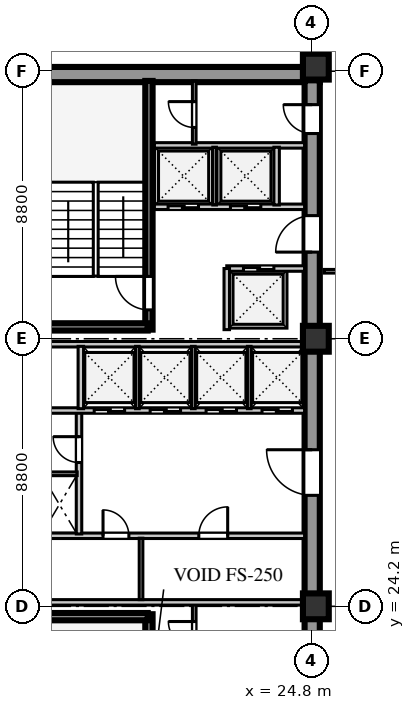
"""IFC4 building model, lengths in metres.
Left out: names, types, materials, properties, quantities, classifications, styles, units other than length and angle.
Written with IfcOpenShell. Run it as: python <this file> out.ifc"""

import sys

from ifc_helpers import new_model, si_unit, direction, frame, frame_2d, origin, origin_2d, place, context, subcontext, project, spatial, rectangle, extrude, element, fill, save


model = new_model("IFC4")
c1 = context("Model", 3, precision=1e-05, world=origin(), true_north=direction((0.0, 1.0)))
c2 = subcontext(c1, "Body", "Model", "MODEL_VIEW")
j1 = project(units=[si_unit("LENGTHUNIT", "METRE"), si_unit("PLANEANGLEUNIT", "RADIAN")], contexts=[c1])
p1 = place(None, origin())
s1 = spatial("IfcSite", under=j1, at=p1, CompositionType="ELEMENT")
p2 = place(p1, origin())
s2 = spatial("IfcBuilding", under=s1, at=p2, CompositionType="ELEMENT")
p3 = place(p2, frame((0.0, 0.0, 111.7)))
s3 = spatial("IfcBuildingStorey", under=s2, at=p3, CompositionType="ELEMENT", Elevation=111.7)
p4 = place(p3, frame((15.4, 41.69, 0.0), z_axis=(0.0, 0.0, 1.0), x_axis=(1.0, 0.0, 0.0)))
e1 = element("IfcWall", 1, at=p4, inside=s3, PredefinedType="SHEAR", context=c2, shape_type="SweptSolid", body=[
    extrude(rectangle(XDim=9.68, YDim=0.5, at=frame_2d((4.84, 0.0))), origin(), (0.0, 0.0, 1.0), 3.6),
])
p5 = place(p3, frame((24.83, 15.74, 0.0), z_axis=(0.0, 0.0, 1.0), x_axis=(0.0, 1.0, 0.0)))
e2 = element("IfcWall", 2, at=p5, inside=s3, PredefinedType="SHEAR", context=c2, shape_type="SweptSolid", body=[
    extrude(rectangle(XDim=25.76, YDim=0.5, at=frame_2d((12.88, 0.0))), origin(), (0.0, 0.0, 1.0), 3.6),
])
p6 = place(p5, frame((1.61, 0.0, 0.0)))
e3 = element("IfcOpeningElement", 3, at=p6, cuts=e2, PredefinedType="OPENING", context=c2, shape_type="SweptSolid", body=[
    extrude(rectangle(XDim=1.2, YDim=2.1, at=frame_2d((0.6, 1.05))), frame((0.0, 0.26, 0.0), z_axis=(0.0, -1.0, 0.0), x_axis=(1.0, 0.0, 0.0)), (0.0, 0.0, 1.0), 0.52),
])
p7 = place(p5, frame((6.78, 0.0, 0.0)))
e4 = element("IfcOpeningElement", 4, at=p7, cuts=e2, PredefinedType="OPENING", context=c2, shape_type="SweptSolid", body=[
    extrude(rectangle(XDim=0.85, YDim=2.06, at=frame_2d((0.425, 1.03))), frame((0.0, 0.26, 0.0), z_axis=(0.0, -1.0, 0.0), x_axis=(1.0, 0.0, 0.0)), (0.0, 0.0, 1.0), 0.52),
])
p8 = place(p5, frame((12.11, 0.0, 0.0)))
e5 = element("IfcOpeningElement", 5, at=p8, cuts=e2, PredefinedType="OPENING", context=c2, shape_type="SweptSolid", body=[
    extrude(rectangle(XDim=1.5, YDim=2.12, at=frame_2d((0.75, 1.06))), frame((0.0, 0.26, 0.0), z_axis=(0.0, -1.0, 0.0), x_axis=(1.0, 0.0, 0.0)), (0.0, 0.0, 1.0), 0.52),
])
p9 = place(p5, frame((20.11, 0.0, 0.0)))
e6 = element("IfcOpeningElement", 6, at=p9, cuts=e2, PredefinedType="OPENING", context=c2, shape_type="SweptSolid", body=[
    extrude(rectangle(XDim=1.2, YDim=2.12, at=frame_2d((0.6, 1.06))), frame((0.0, 0.26, 0.0), z_axis=(0.0, -1.0, 0.0), x_axis=(1.0, 0.0, 0.0)), (0.0, 0.0, 1.0), 0.52),
])
p10 = place(p5, frame((24.01, 0.0, 0.0)))
e7 = element("IfcOpeningElement", 7, at=p10, cuts=e2, PredefinedType="OPENING", context=c2, shape_type="SweptSolid", body=[
    extrude(rectangle(XDim=0.95, YDim=2.1, at=frame_2d((0.475, 1.05))), frame((0.0, 0.26, 0.0), z_axis=(0.0, -1.0, 0.0), x_axis=(1.0, 0.0, 0.0)), (0.0, 0.0, 1.0), 0.52),
])
for number, where, z_axis, x_axis in (
    (8, (24.95, 24.2, 0.0), (0.0, 0.0, 1.0), (1.0, 0.0, 0.0)),
    (9, (24.95, 33.0, 0.0), (0.0, 0.0, 1.0), (1.0, 0.0, 0.0)),
    (10, (24.95, 41.95, 0.0), (0.0, 0.0, 1.0), (1.0, 0.0, 0.0)),
):
    element("IfcColumn", number, at=place(p3, frame(where, z_axis=z_axis, x_axis=x_axis)), inside=s3, PredefinedType="COLUMN", context=c2, shape_type="SweptSolid", body=[
        extrude(rectangle(XDim=0.85, YDim=0.85, at=origin_2d()), origin(), (0.0, 0.0, 1.0), 3.6),
    ])
p11 = place(p3, frame((19.46, 15.74, 0.0), z_axis=(0.0, 0.0, 1.0), x_axis=(0.0, 1.0, 0.0)))
e11 = element("IfcWall", 11, at=p11, inside=s3, PredefinedType="SHEAR", context=c2, shape_type="SweptSolid", body=[
    extrude(rectangle(XDim=8.2, YDim=0.24, at=frame_2d((4.1, 0.0))), origin(), (0.0, 0.0, 1.0), 3.85),
])
p12 = place(p11, frame((0.45, 0.0, 0.0)))
e12 = element("IfcOpeningElement", 12, at=p12, cuts=e11, PredefinedType="OPENING", context=c2, shape_type="SweptSolid", body=[
    extrude(rectangle(XDim=1.1, YDim=2.1, at=frame_2d((0.55, 1.05))), frame((0.0, 0.13, 0.0), z_axis=(0.0, -1.0, 0.0), x_axis=(1.0, 0.0, 0.0)), (0.0, 0.0, 1.0), 0.26),
])
p13 = place(p3, frame((15.9, 23.86, 0.0), z_axis=(0.0, 0.0, 1.0), x_axis=(1.0, 0.0, 0.0)))
e13 = element("IfcWall", 13, at=p13, inside=s3, PredefinedType="SHEAR", context=c2, shape_type="SweptSolid", body=[
    extrude(rectangle(XDim=3.52, YDim=0.24, at=frame_2d((1.76, 0.0))), origin(), (0.0, 0.0, 1.0), 3.85),
])
p14 = place(p3, frame((20.95, 22.4, 0.0), z_axis=(0.0, 0.0, 1.0), x_axis=(0.0, 1.0, 0.0)))
e14 = element("IfcWall", 14, at=p14, inside=s3, PredefinedType="PARTITIONING", context=c2, shape_type="SweptSolid", body=[
    extrude(rectangle(XDim=1.88, YDim=0.12, at=frame_2d((0.94, 0.0))), origin(), (0.0, 0.0, 1.0), 3.6),
])
p15 = place(p14, frame((0.45, 0.0, 0.0)))
e15 = element("IfcOpeningElement", 15, at=p15, cuts=e14, PredefinedType="OPENING", context=c2, shape_type="SweptSolid", body=[
    extrude(rectangle(XDim=0.85, YDim=2.06, at=frame_2d((0.425, 1.03))), frame((0.0, 0.07, 0.0), z_axis=(0.0, -1.0, 0.0), x_axis=(1.0, 0.0, 0.0)), (0.0, 0.0, 1.0), 0.14),
])
p16 = place(p3, frame((15.9, 26.52, 0.0), z_axis=(0.0, 0.0, 1.0), x_axis=(1.0, 0.0, 0.0)))
e16 = element("IfcWall", 16, at=p16, inside=s3, PredefinedType="SOLIDWALL", context=c2, shape_type="SweptSolid", body=[
    extrude(rectangle(XDim=8.68, YDim=0.18, at=frame_2d((4.34, 0.0))), origin(), (0.0, 0.0, 1.0), 3.6),
])
p17 = place(p16, frame((2.05, 0.0, 0.0)))
e17 = element("IfcOpeningElement", 17, at=p17, cuts=e16, PredefinedType="OPENING", context=c2, shape_type="SweptSolid", body=[
    extrude(rectangle(XDim=0.85, YDim=2.06, at=frame_2d((0.425, 1.03))), frame((0.0, 0.1, 0.0), z_axis=(0.0, -1.0, 0.0), x_axis=(1.0, 0.0, 0.0)), (0.0, 0.0, 1.0), 0.2),
])
p18 = place(p16, frame((5.2, 0.0, 0.0)))
e18 = element("IfcOpeningElement", 18, at=p18, cuts=e16, PredefinedType="OPENING", context=c2, shape_type="SweptSolid", body=[
    extrude(rectangle(XDim=0.95, YDim=2.1, at=frame_2d((0.475, 1.05))), frame((0.0, 0.1, 0.0), z_axis=(0.0, -1.0, 0.0), x_axis=(1.0, 0.0, 0.0)), (0.0, 0.0, 1.0), 0.2),
])
p19 = place(p3, frame((15.9, 24.33, 0.0), z_axis=(0.0, 0.0, 1.0), x_axis=(1.0, 0.0, 0.0)))
e19 = element("IfcWall", 19, at=p19, inside=s3, PredefinedType="SOLIDWALL", context=c2, shape_type="SweptSolid", body=[
    extrude(rectangle(XDim=8.68, YDim=0.18, at=frame_2d((4.34, 0.0))), origin(), (0.0, 0.0, 1.0), 2.95),
])
p20 = place(p3, frame((19.2, 24.42, 0.0), z_axis=(0.0, 0.0, 1.0), x_axis=(0.0, 1.0, 0.0)))
e20 = element("IfcWall", 20, at=p20, inside=s3, PredefinedType="PARTITIONING", context=c2, shape_type="SweptSolid", body=[
    extrude(rectangle(XDim=2.02, YDim=0.12, at=frame_2d((1.01, 0.0))), origin(), (0.0, 0.0, 1.0), 3.6),
])
p21 = place(p3, frame((17.16, 26.58, 0.0), z_axis=(0.0, 0.0, 1.0), x_axis=(0.0, 1.0, 0.0)))
e21 = element("IfcWall", 21, at=p21, inside=s3, PredefinedType="SOLIDWALL", context=c2, shape_type="SweptSolid", body=[
    extrude(rectangle(XDim=4.02, YDim=0.18, at=frame_2d((2.01, 0.0))), origin(), (0.0, 0.0, 1.0), 3.6),
])
p22 = place(p21, frame((2.35, 0.0, 0.0)))
e22 = element("IfcOpeningElement", 22, at=p22, cuts=e21, PredefinedType="OPENING", context=c2, shape_type="SweptSolid", body=[
    extrude(rectangle(XDim=0.85, YDim=2.06, at=frame_2d((0.425, 1.03))), frame((0.0, 0.1, 0.0), z_axis=(0.0, -1.0, 0.0), x_axis=(1.0, 0.0, 0.0)), (0.0, 0.0, 1.0), 0.2),
])
p23 = place(p3, frame((15.9, 28.56, 0.0), z_axis=(0.0, 0.0, 1.0), x_axis=(1.0, 0.0, 0.0)))
e23 = element("IfcWall", 23, at=p23, inside=s3, PredefinedType="PARTITIONING", context=c2, shape_type="SweptSolid", body=[
    extrude(rectangle(XDim=1.2, YDim=0.12, at=frame_2d((0.6, 0.0))), origin(), (0.0, 0.0, 1.0), 3.6),
])
p24 = place(p3, frame((15.9, 30.64, 0.0), z_axis=(0.0, 0.0, 1.0), x_axis=(1.0, 0.0, 0.0)))
e24 = element("IfcWall", 24, at=p24, inside=s3, PredefinedType="SOLIDWALL", context=c2, shape_type="SweptSolid", body=[
    extrude(rectangle(XDim=8.68, YDim=0.18, at=frame_2d((4.34, 0.0))), origin(), (0.0, 0.0, 1.0), 3.6),
])
p25 = place(p24, frame((1.76, 0.0, 0.0)))
e25 = element("IfcOpeningElement", 25, at=p25, cuts=e24, PredefinedType="OPENING", context=c2, shape_type="SweptSolid", body=[
    extrude(rectangle(XDim=1.0, YDim=2.1, at=frame_2d((0.5, 1.05))), frame((0.0, 0.1, 0.0), z_axis=(0.0, -1.0, 0.0), x_axis=(1.0, 0.0, 0.0)), (0.0, 0.0, 1.0), 0.2),
])
p26 = place(p24, frame((3.6, 0.0, 0.0)))
e26 = element("IfcOpeningElement", 26, at=p26, cuts=e24, PredefinedType="OPENING", context=c2, shape_type="SweptSolid", body=[
    extrude(rectangle(XDim=1.0, YDim=2.1, at=frame_2d((0.5, 1.05))), frame((0.0, 0.1, 0.0), z_axis=(0.0, -1.0, 0.0), x_axis=(1.0, 0.0, 0.0)), (0.0, 0.0, 1.0), 0.2),
])
p27 = place(p24, frame((5.44, 0.0, 0.0)))
e27 = element("IfcOpeningElement", 27, at=p27, cuts=e24, PredefinedType="OPENING", context=c2, shape_type="SweptSolid", body=[
    extrude(rectangle(XDim=1.0, YDim=2.1, at=frame_2d((0.5, 1.05))), frame((0.0, 0.1, 0.0), z_axis=(0.0, -1.0, 0.0), x_axis=(1.0, 0.0, 0.0)), (0.0, 0.0, 1.0), 0.2),
])
p28 = place(p24, frame((7.28, 0.0, 0.0)))
e28 = element("IfcOpeningElement", 28, at=p28, cuts=e24, PredefinedType="OPENING", context=c2, shape_type="SweptSolid", body=[
    extrude(rectangle(XDim=1.0, YDim=2.1, at=frame_2d((0.5, 1.05))), frame((0.0, 0.1, 0.0), z_axis=(0.0, -1.0, 0.0), x_axis=(1.0, 0.0, 0.0)), (0.0, 0.0, 1.0), 0.2),
])
p29 = place(p3, frame((15.9, 32.82, 0.0), z_axis=(0.0, 0.0, 1.0), x_axis=(1.0, 0.0, 0.0)))
e29 = element("IfcWall", 29, at=p29, inside=s3, PredefinedType="SOLIDWALL", context=c2, shape_type="SweptSolid", body=[
    extrude(rectangle(XDim=8.68, YDim=0.18, at=frame_2d((4.34, 0.0))), origin(), (0.0, 0.0, 1.0), 2.95),
])
p30 = place(p3, frame((17.22, 30.7, 0.0), z_axis=(0.0, 0.0, 1.0), x_axis=(0.0, 1.0, 0.0)))
e30 = element("IfcWall", 30, at=p30, inside=s3, PredefinedType="SOLIDWALL", context=c2, shape_type="SweptSolid", body=[
    extrude(rectangle(XDim=2.05, YDim=0.18, at=frame_2d((1.025, 0.0))), origin(), (0.0, 0.0, 1.0), 3.6),
])
for number, where, z_axis, x_axis in (
    (31, (19.08, 30.7, 0.0), (0.0, 0.0, 1.0), (0.0, 1.0, 0.0)),
    (32, (20.92, 30.7, 0.0), (0.0, 0.0, 1.0), (0.0, 1.0, 0.0)),
    (33, (22.76, 30.7, 0.0), (0.0, 0.0, 1.0), (0.0, 1.0, 0.0)),
):
    element("IfcWall", number, at=place(p3, frame(where, z_axis=z_axis, x_axis=x_axis)), inside=s3, PredefinedType="PARTITIONING", context=c2, shape_type="SweptSolid", body=[
        extrude(rectangle(XDim=2.05, YDim=0.12, at=frame_2d((1.025, 0.0))), origin(), (0.0, 0.0, 1.0), 3.6),
    ])
p31 = place(p3, frame((19.46, 33.3, 0.0), z_axis=(0.0, 0.0, 1.0), x_axis=(0.0, 1.0, 0.0)))
e34 = element("IfcWall", 34, at=p31, inside=s3, PredefinedType="SHEAR", context=c2, shape_type="SweptSolid", body=[
    extrude(rectangle(XDim=8.18, YDim=0.24, at=frame_2d((4.09, 0.0))), origin(), (0.0, 0.0, 1.0), 3.85),
])
p32 = place(p31, frame((0.65, 0.0, 0.0)))
e35 = element("IfcOpeningElement", 35, at=p32, cuts=e34, PredefinedType="OPENING", context=c2, shape_type="SweptSolid", body=[
    extrude(rectangle(XDim=1.1, YDim=2.1, at=frame_2d((0.55, 1.05))), frame((0.0, 0.13, 0.0), z_axis=(0.0, -1.0, 0.0), x_axis=(1.0, 0.0, 0.0)), (0.0, 0.0, 1.0), 0.26),
])
p33 = place(p3, frame((15.9, 33.39, 0.0), z_axis=(0.0, 0.0, 1.0), x_axis=(1.0, 0.0, 0.0)))
e36 = element("IfcWall", 36, at=p33, inside=s3, PredefinedType="SHEAR", context=c2, shape_type="SweptSolid", body=[
    extrude(rectangle(XDim=3.52, YDim=0.24, at=frame_2d((1.76, 0.0))), origin(), (0.0, 0.0, 1.0), 3.85),
])
p34 = place(p3, frame((22.02, 35.31, 0.0), z_axis=(0.0, 0.0, 1.0), x_axis=(1.0, 0.0, 0.0)))
e37 = element("IfcWall", 37, at=p34, inside=s3, PredefinedType="SOLIDWALL", context=c2, shape_type="SweptSolid", body=[
    extrude(rectangle(XDim=2.56, YDim=0.18, at=frame_2d((1.28, 0.0))), origin(), (0.0, 0.0, 1.0), 3.6),
])
p35 = place(p34, frame((0.55, 0.0, 0.0)))
e38 = element("IfcOpeningElement", 38, at=p35, cuts=e37, PredefinedType="OPENING", context=c2, shape_type="SweptSolid", body=[
    extrude(rectangle(XDim=1.0, YDim=2.1, at=frame_2d((0.5, 1.05))), frame((0.0, 0.1, 0.0), z_axis=(0.0, -1.0, 0.0), x_axis=(1.0, 0.0, 0.0)), (0.0, 0.0, 1.0), 0.2),
])
p36 = place(p3, frame((22.02, 33.3, 0.0), z_axis=(0.0, 0.0, 1.0), x_axis=(0.0, 1.0, 0.0)))
e39 = element("IfcWall", 39, at=p36, inside=s3, PredefinedType="SOLIDWALL", context=c2, shape_type="SweptSolid", body=[
    extrude(rectangle(XDim=2.01, YDim=0.18, at=frame_2d((1.005, 0.0))), origin(), (0.0, 0.0, 1.0), 3.6),
])
p37 = place(p3, frame((19.64, 37.34, 0.0), z_axis=(0.0, 0.0, 1.0), x_axis=(1.0, 0.0, 0.0)))
e40 = element("IfcWall", 40, at=p37, inside=s3, PredefinedType="SOLIDWALL", context=c2, shape_type="SweptSolid", body=[
    extrude(rectangle(XDim=4.94, YDim=0.18, at=frame_2d((2.47, 0.0))), origin(), (0.0, 0.0, 1.0), 3.6),
])
p38 = place(p37, frame((0.45, 0.0, 0.0)))
e41 = element("IfcOpeningElement", 41, at=p38, cuts=e40, PredefinedType="OPENING", context=c2, shape_type="SweptSolid", body=[
    extrude(rectangle(XDim=1.0, YDim=2.1, at=frame_2d((0.5, 1.05))), frame((0.0, 0.1, 0.0), z_axis=(0.0, -1.0, 0.0), x_axis=(1.0, 0.0, 0.0)), (0.0, 0.0, 1.0), 0.2),
])
p39 = place(p37, frame((2.5, 0.0, 0.0)))
e42 = element("IfcOpeningElement", 42, at=p39, cuts=e40, PredefinedType="OPENING", context=c2, shape_type="SweptSolid", body=[
    extrude(rectangle(XDim=1.0, YDim=2.1, at=frame_2d((0.5, 1.05))), frame((0.0, 0.1, 0.0), z_axis=(0.0, -1.0, 0.0), x_axis=(1.0, 0.0, 0.0)), (0.0, 0.0, 1.0), 0.2),
])
p40 = place(p3, frame((19.64, 39.36, 0.0), z_axis=(0.0, 0.0, 1.0), x_axis=(1.0, 0.0, 0.0)))
e43 = element("IfcWall", 43, at=p40, inside=s3, PredefinedType="SOLIDWALL", context=c2, shape_type="SweptSolid", body=[
    extrude(rectangle(XDim=4.94, YDim=0.18, at=frame_2d((2.47, 0.0))), origin(), (0.0, 0.0, 1.0), 3.6),
])
p41 = place(p3, frame((21.62, 37.4, 0.0), z_axis=(0.0, 0.0, 1.0), x_axis=(0.0, 1.0, 0.0)))
e44 = element("IfcWall", 44, at=p41, inside=s3, PredefinedType="PARTITIONING", context=c2, shape_type="SweptSolid", body=[
    extrude(rectangle(XDim=1.9, YDim=0.12, at=frame_2d((0.95, 0.0))), origin(), (0.0, 0.0, 1.0), 3.6),
])
p42 = place(p3, frame((23.66, 37.4, 0.0), z_axis=(0.0, 0.0, 1.0), x_axis=(0.0, 1.0, 0.0)))
e45 = element("IfcWall", 45, at=p42, inside=s3, PredefinedType="SOLIDWALL", context=c2, shape_type="SweptSolid", body=[
    extrude(rectangle(XDim=1.9, YDim=0.18, at=frame_2d((0.95, 0.0))), origin(), (0.0, 0.0, 1.0), 3.6),
])
p43 = place(p3, frame((20.95, 39.4, 0.0), z_axis=(0.0, 0.0, 1.0), x_axis=(0.0, 1.0, 0.0)))
e46 = element("IfcWall", 46, at=p43, inside=s3, PredefinedType="PARTITIONING", context=c2, shape_type="SweptSolid", body=[
    extrude(rectangle(XDim=2.08, YDim=0.12, at=frame_2d((1.04, 0.0))), origin(), (0.0, 0.0, 1.0), 3.6),
])
p44 = place(p43, frame((0.55, 0.0, 0.0)))
e47 = element("IfcOpeningElement", 47, at=p44, cuts=e46, PredefinedType="OPENING", context=c2, shape_type="SweptSolid", body=[
    extrude(rectangle(XDim=0.85, YDim=2.06, at=frame_2d((0.425, 1.03))), frame((0.0, 0.07, 0.0), z_axis=(0.0, -1.0, 0.0), x_axis=(1.0, 0.0, 0.0)), (0.0, 0.0, 1.0), 0.14),
])
p45 = place(p3, frame((25.22, 35.22, 0.0), z_axis=(0.0, 0.0, 1.0), x_axis=(1.0, 0.0, 0.0)))
e48 = element("IfcWall", 48, at=p45, inside=s3, PredefinedType="PARTITIONING", context=c2, shape_type="SweptSolid", body=[
    extrude(rectangle(XDim=9.5, YDim=0.12, at=frame_2d((4.75, 0.0))), origin(), (0.0, 0.0, 1.0), 3.6),
])
p46 = place(p45, frame((0.65, 0.0, 0.0)))
e49 = element("IfcOpeningElement", 49, at=p46, cuts=e48, PredefinedType="OPENING", context=c2, shape_type="SweptSolid", body=[
    extrude(rectangle(XDim=0.95, YDim=2.1, at=frame_2d((0.475, 1.05))), frame((0.0, 0.07, 0.0), z_axis=(0.0, -1.0, 0.0), x_axis=(1.0, 0.0, 0.0)), (0.0, 0.0, 1.0), 0.14),
])
p47 = place(p45, frame((5.4, 0.0, 0.0)))
e50 = element("IfcOpeningElement", 50, at=p47, cuts=e48, PredefinedType="OPENING", context=c2, shape_type="SweptSolid", body=[
    extrude(rectangle(XDim=1.05, YDim=2.1, at=frame_2d((0.525, 1.05))), frame((0.0, 0.07, 0.0), z_axis=(0.0, -1.0, 0.0), x_axis=(1.0, 0.0, 0.0)), (0.0, 0.0, 1.0), 0.14),
])
p48 = place(p15, origin())
e51 = element("IfcDoor", 51, at=p48, inside=s3, OperationType="SINGLE_SWING_RIGHT", PredefinedType="DOOR", context=c2, shape_type="SweptSolid", body=[
    extrude(rectangle(XDim=0.85, YDim=2.06, at=frame_2d((0.425, 1.03))), frame((0.0, 0.025, 0.0), z_axis=(0.0, -1.0, 0.0), x_axis=(1.0, 0.0, 0.0)), (0.0, 0.0, 1.0), 0.05),
])
fill(e15, e51)
p49 = place(p17, origin())
e52 = element("IfcDoor", 52, at=p49, inside=s3, OperationType="SINGLE_SWING_LEFT", PredefinedType="DOOR", context=c2, shape_type="SweptSolid", body=[
    extrude(rectangle(XDim=0.85, YDim=2.06, at=frame_2d((0.425, 1.03))), frame((0.0, 0.025, 0.0), z_axis=(0.0, -1.0, 0.0), x_axis=(1.0, 0.0, 0.0)), (0.0, 0.0, 1.0), 0.05),
])
fill(e17, e52)
p50 = place(p18, origin())
e53 = element("IfcDoor", 53, at=p50, inside=s3, OperationType="SINGLE_SWING_RIGHT", PredefinedType="DOOR", context=c2, shape_type="SweptSolid", body=[
    extrude(rectangle(XDim=0.95, YDim=2.1, at=frame_2d((0.475, 1.05))), frame((0.0, 0.025, 0.0), z_axis=(0.0, -1.0, 0.0), x_axis=(1.0, 0.0, 0.0)), (0.0, 0.0, 1.0), 0.05),
])
fill(e18, e53)
p51 = place(p22, origin())
e54 = element("IfcDoor", 54, at=p51, inside=s3, OperationType="SINGLE_SWING_RIGHT", PredefinedType="DOOR", context=c2, shape_type="SweptSolid", body=[
    extrude(rectangle(XDim=0.85, YDim=2.06, at=frame_2d((0.425, 1.03))), frame((0.0, 0.025, 0.0), z_axis=(0.0, -1.0, 0.0), x_axis=(1.0, 0.0, 0.0)), (0.0, 0.0, 1.0), 0.05),
])
fill(e22, e54)
p52 = place(p8, frame((1.5, 0.0, 0.0), z_axis=(0.0, 0.0, 1.0), x_axis=(-1.0, 0.0, 0.0)))
e55 = element("IfcDoor", 55, at=p52, inside=s3, OperationType="SINGLE_SWING_LEFT", PredefinedType="DOOR", context=c2, shape_type="SweptSolid", body=[
    extrude(rectangle(XDim=1.5, YDim=2.12, at=frame_2d((0.75, 1.06))), frame((0.0, 0.025, 0.0), z_axis=(0.0, -1.0, 0.0), x_axis=(1.0, 0.0, 0.0)), (0.0, 0.0, 1.0), 0.05),
])
fill(e5, e55)
p53 = place(p25, frame((1.0, 0.0, 0.0), z_axis=(0.0, 0.0, 1.0), x_axis=(-1.0, 0.0, 0.0)))
e56 = element("IfcDoor", 56, at=p53, inside=s3, OperationType="DOUBLE_DOOR_SLIDING", PredefinedType="DOOR", context=c2, shape_type="SweptSolid", body=[
    extrude(rectangle(XDim=1.0, YDim=2.1, at=frame_2d((0.5, 1.05))), frame((0.0, 0.025, 0.0), z_axis=(0.0, -1.0, 0.0), x_axis=(1.0, 0.0, 0.0)), (0.0, 0.0, 1.0), 0.05),
])
fill(e25, e56)
p54 = place(p26, frame((1.0, 0.0, 0.0), z_axis=(0.0, 0.0, 1.0), x_axis=(-1.0, 0.0, 0.0)))
e57 = element("IfcDoor", 57, at=p54, inside=s3, OperationType="DOUBLE_DOOR_SLIDING", PredefinedType="DOOR", context=c2, shape_type="SweptSolid", body=[
    extrude(rectangle(XDim=1.0, YDim=2.1, at=frame_2d((0.5, 1.05))), frame((0.0, 0.025, 0.0), z_axis=(0.0, -1.0, 0.0), x_axis=(1.0, 0.0, 0.0)), (0.0, 0.0, 1.0), 0.05),
])
fill(e26, e57)
p55 = place(p27, frame((1.0, 0.0, 0.0), z_axis=(0.0, 0.0, 1.0), x_axis=(-1.0, 0.0, 0.0)))
e58 = element("IfcDoor", 58, at=p55, inside=s3, OperationType="DOUBLE_DOOR_SLIDING", PredefinedType="DOOR", context=c2, shape_type="SweptSolid", body=[
    extrude(rectangle(XDim=1.0, YDim=2.1, at=frame_2d((0.5, 1.05))), frame((0.0, 0.025, 0.0), z_axis=(0.0, -1.0, 0.0), x_axis=(1.0, 0.0, 0.0)), (0.0, 0.0, 1.0), 0.05),
])
fill(e27, e58)
p56 = place(p28, frame((1.0, 0.0, 0.0), z_axis=(0.0, 0.0, 1.0), x_axis=(-1.0, 0.0, 0.0)))
e59 = element("IfcDoor", 59, at=p56, inside=s3, OperationType="DOUBLE_DOOR_SLIDING", PredefinedType="DOOR", context=c2, shape_type="SweptSolid", body=[
    extrude(rectangle(XDim=1.0, YDim=2.1, at=frame_2d((0.5, 1.05))), frame((0.0, 0.025, 0.0), z_axis=(0.0, -1.0, 0.0), x_axis=(1.0, 0.0, 0.0)), (0.0, 0.0, 1.0), 0.05),
])
fill(e28, e59)
p57 = place(p32, origin())
e60 = element("IfcDoor", 60, at=p57, inside=s3, OperationType="SINGLE_SWING_RIGHT", PredefinedType="DOOR", context=c2, shape_type="SweptSolid", body=[
    extrude(rectangle(XDim=1.1, YDim=2.1, at=frame_2d((0.55, 1.05))), frame((0.0, 0.025, 0.0), z_axis=(0.0, -1.0, 0.0), x_axis=(1.0, 0.0, 0.0)), (0.0, 0.0, 1.0), 0.05),
])
fill(e35, e60)
p58 = place(p9, frame((1.2, 0.0, 0.0), z_axis=(0.0, 0.0, 1.0), x_axis=(-1.0, 0.0, 0.0)))
e61 = element("IfcDoor", 61, at=p58, inside=s3, OperationType="SINGLE_SWING_RIGHT", PredefinedType="DOOR", context=c2, shape_type="SweptSolid", body=[
    extrude(rectangle(XDim=1.2, YDim=2.12, at=frame_2d((0.6, 1.06))), frame((0.0, 0.025, 0.0), z_axis=(0.0, -1.0, 0.0), x_axis=(1.0, 0.0, 0.0)), (0.0, 0.0, 1.0), 0.05),
])
fill(e6, e61)
p59 = place(p38, frame((1.0, 0.0, 0.0), z_axis=(0.0, 0.0, 1.0), x_axis=(-1.0, 0.0, 0.0)))
e62 = element("IfcDoor", 62, at=p59, inside=s3, OperationType="DOUBLE_DOOR_SLIDING", PredefinedType="DOOR", context=c2, shape_type="SweptSolid", body=[
    extrude(rectangle(XDim=1.0, YDim=2.1, at=frame_2d((0.5, 1.05))), frame((0.0, 0.025, 0.0), z_axis=(0.0, -1.0, 0.0), x_axis=(1.0, 0.0, 0.0)), (0.0, 0.0, 1.0), 0.05),
])
fill(e41, e62)
p60 = place(p39, frame((1.0, 0.0, 0.0), z_axis=(0.0, 0.0, 1.0), x_axis=(-1.0, 0.0, 0.0)))
e63 = element("IfcDoor", 63, at=p60, inside=s3, OperationType="DOUBLE_DOOR_SLIDING", PredefinedType="DOOR", context=c2, shape_type="SweptSolid", body=[
    extrude(rectangle(XDim=1.0, YDim=2.1, at=frame_2d((0.5, 1.05))), frame((0.0, 0.025, 0.0), z_axis=(0.0, -1.0, 0.0), x_axis=(1.0, 0.0, 0.0)), (0.0, 0.0, 1.0), 0.05),
])
fill(e42, e63)
p61 = place(p35, origin())
e64 = element("IfcDoor", 64, at=p61, inside=s3, OperationType="DOUBLE_DOOR_SLIDING", PredefinedType="DOOR", context=c2, shape_type="SweptSolid", body=[
    extrude(rectangle(XDim=1.0, YDim=2.1, at=frame_2d((0.5, 1.05))), frame((0.0, 0.025, 0.0), z_axis=(0.0, -1.0, 0.0), x_axis=(1.0, 0.0, 0.0)), (0.0, 0.0, 1.0), 0.05),
])
fill(e38, e64)
p62 = place(p44, origin())
e65 = element("IfcDoor", 65, at=p62, inside=s3, OperationType="SINGLE_SWING_RIGHT", PredefinedType="DOOR", context=c2, shape_type="SweptSolid", body=[
    extrude(rectangle(XDim=0.85, YDim=2.06, at=frame_2d((0.425, 1.03))), frame((0.0, 0.025, 0.0), z_axis=(0.0, -1.0, 0.0), x_axis=(1.0, 0.0, 0.0)), (0.0, 0.0, 1.0), 0.05),
])
fill(e47, e65)
p63 = place(p10, frame((0.95, 0.0, 0.0), z_axis=(0.0, 0.0, 1.0), x_axis=(-1.0, 0.0, 0.0)))
e66 = element("IfcDoor", 66, at=p63, inside=s3, OperationType="SINGLE_SWING_LEFT", PredefinedType="DOOR", context=c2, shape_type="SweptSolid", body=[
    extrude(rectangle(XDim=0.95, YDim=2.1, at=frame_2d((0.475, 1.05))), frame((0.0, 0.025, 0.0), z_axis=(0.0, -1.0, 0.0), x_axis=(1.0, 0.0, 0.0)), (0.0, 0.0, 1.0), 0.05),
])
fill(e7, e66)
save(model, sys.argv[1])
